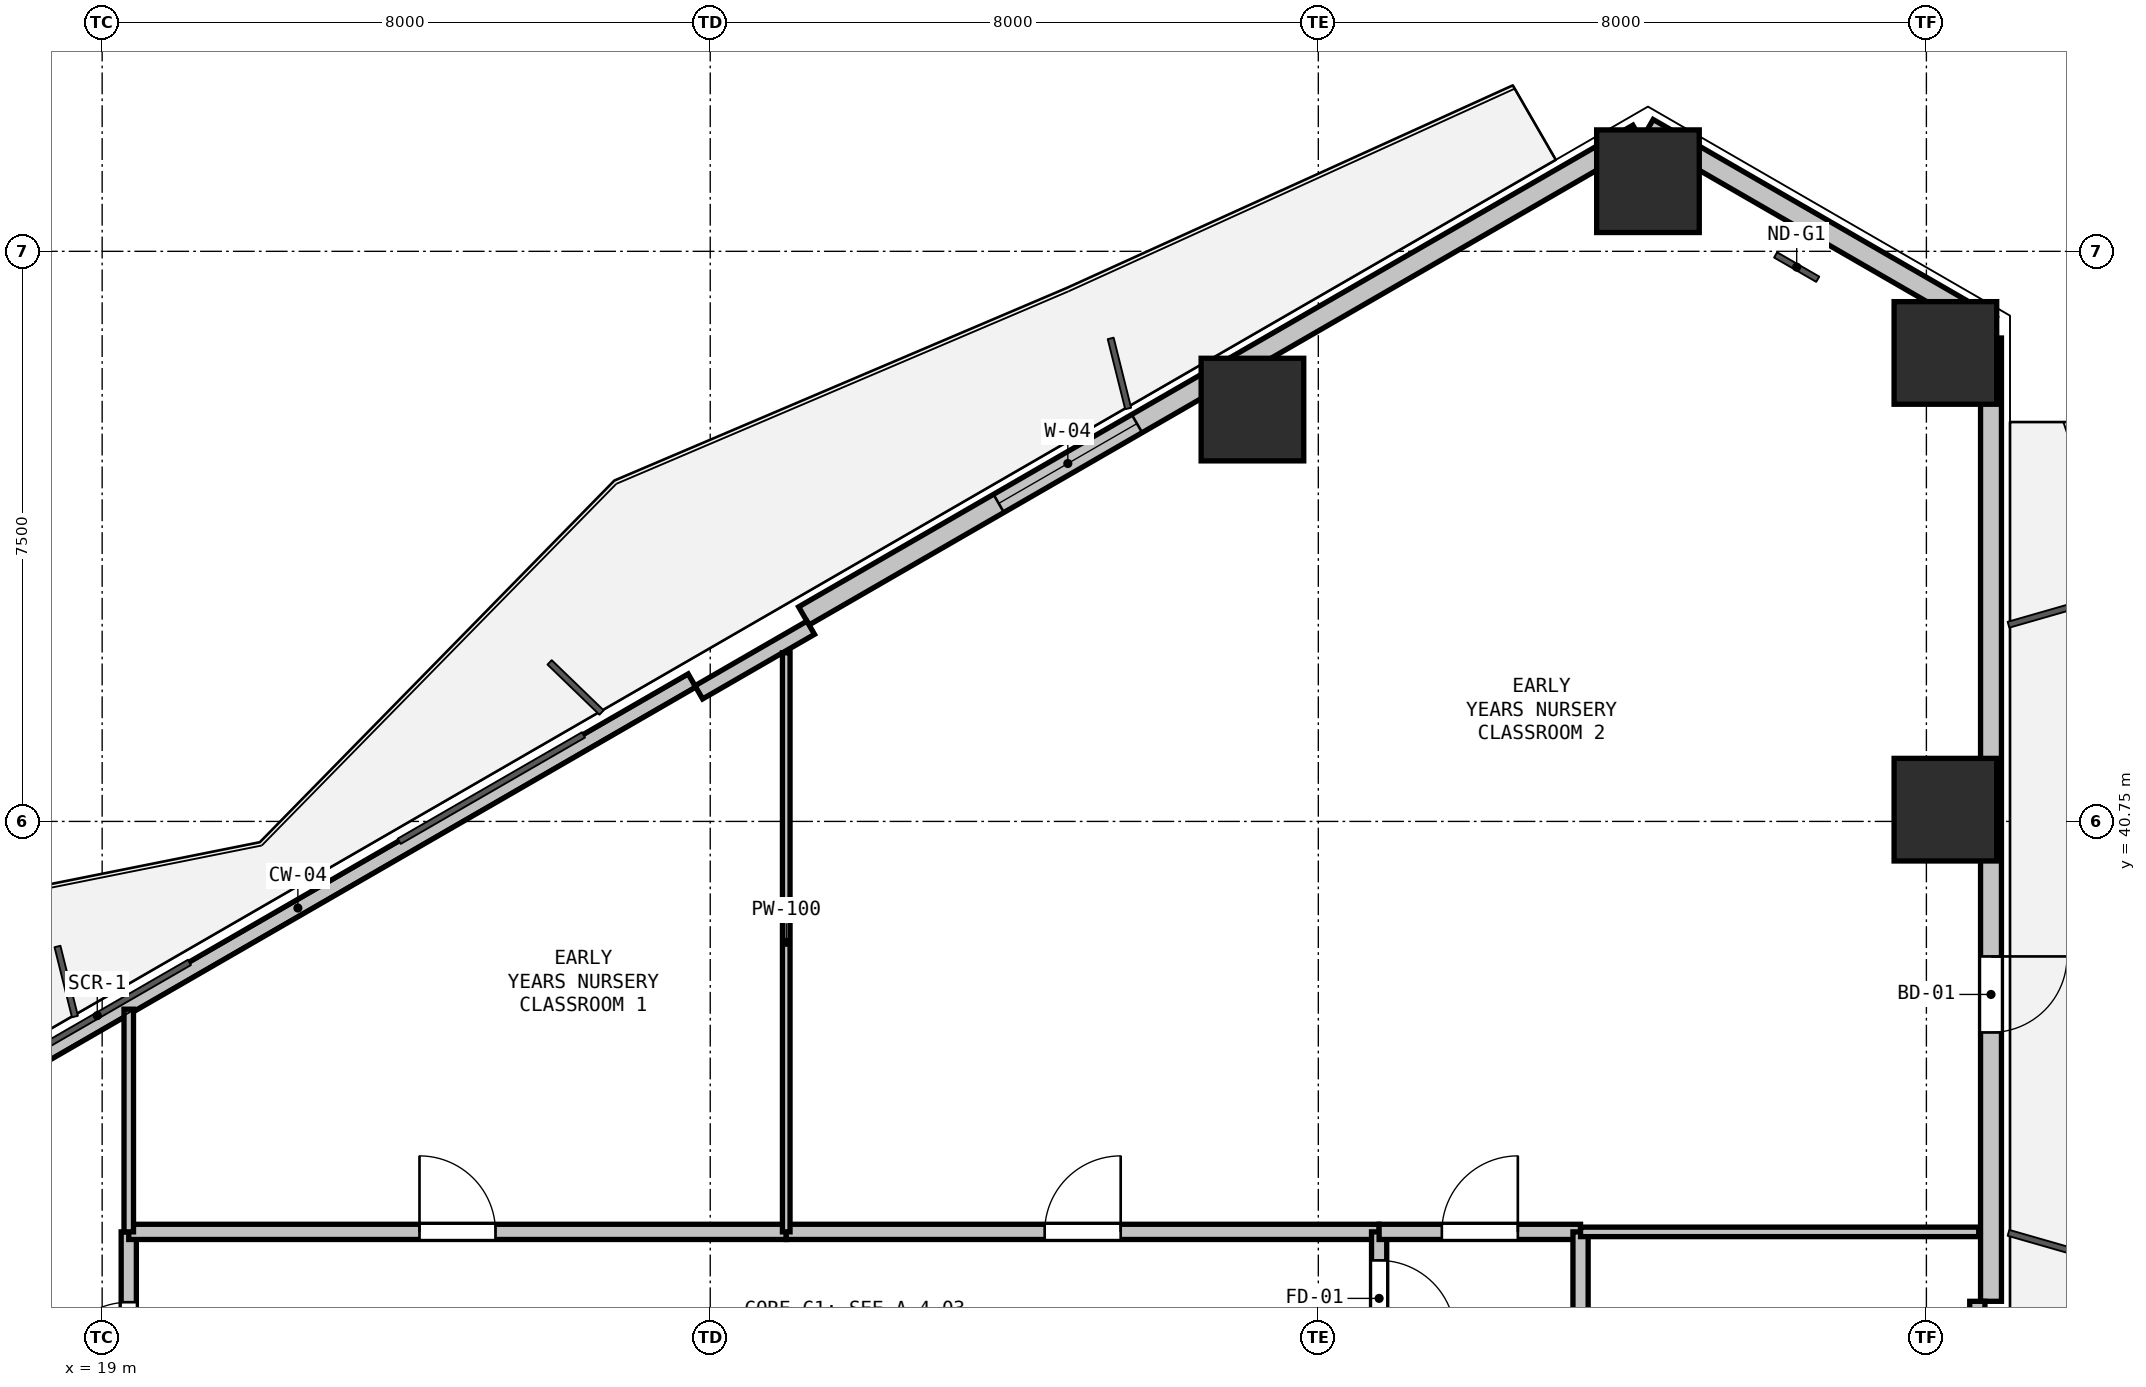
"""IFC4 building model, lengths in metres.
Left out: names, types, materials, properties, quantities, classifications, styles, units other than length and angle.
Written with IfcOpenShell. Run it as: python <this file> out.ifc"""

import sys

from ifc_helpers import new_model, si_unit, direction, frame, frame_2d, origin, origin_2d, place, context, subcontext, project, spatial, rectangle, hollow_rectangle, extrude, element, fill, save


model = new_model("IFC4")
c1 = context("Model", 3, precision=1e-05, world=origin(), true_north=direction((0.0, 1.0)))
c2 = subcontext(c1, "Body", "Model", "MODEL_VIEW")
j1 = project(units=[si_unit("LENGTHUNIT", "METRE"), si_unit("PLANEANGLEUNIT", "RADIAN")], contexts=[c1])
p1 = place(None, origin())
s1 = spatial("IfcSite", under=j1, at=p1, CompositionType="ELEMENT")
p2 = place(p1, origin())
s2 = spatial("IfcBuilding", under=s1, at=p2, CompositionType="ELEMENT")
p3 = place(p2, frame((0.0, 0.0, 19.2)))
s3 = spatial("IfcBuildingStorey", under=s2, at=p3, CompositionType="ELEMENT", Elevation=19.2)
for number, where, z_axis, x_axis in (
    (1, (34.133, 46.168, 0.0), (0.0, 0.0, 1.0), (1.0, 0.0, 0.0)),
    (2, (39.337, 49.173, 0.0), (0.0, 0.0, 1.0), (1.0, 0.0, 0.0)),
    (3, (43.25, 46.913, 0.0), (0.0, 0.0, 1.0), (1.0, 0.0, 0.0)),
    (4, (43.25, 40.905, 0.0), (0.0, 0.0, 1.0), (1.0, 0.0, 0.0)),
):
    element("IfcColumn", number, at=place(p3, frame(where, z_axis=z_axis, x_axis=x_axis)), inside=s3, PredefinedType="COLUMN", context=c2, shape_type="SweptSolid", body=[
        extrude(hollow_rectangle(XDim=1.35, YDim=1.35, WallThickness=0.036, at=origin_2d()), origin(), (0.0, 0.0, 1.0), 3.3),
    ])
p4 = place(p3, frame((39.337, 49.865, 0.0), z_axis=(0.0, 0.0, 1.0), x_axis=(0.866043601342, -0.499968479581, 0.0)))
e5 = element("IfcWall", 5, at=p4, inside=s3, PredefinedType="SOLIDWALL", context=c2, shape_type="SweptSolid", body=[
    extrude(rectangle(XDim=5.211, YDim=0.275, at=frame_2d((2.605, 0.0))), origin(), (0.0, 0.0, 1.0), 2.66),
])
p5 = place(p3, frame((16.39, 36.617, 0.0), z_axis=(0.0, 0.0, 1.0), x_axis=(0.866027351828, 0.499996625875, 0.0)))
e6 = element("IfcWall", 6, at=p5, inside=s3, PredefinedType="PARAPET", context=c2, shape_type="SweptSolid", body=[
    extrude(rectangle(XDim=11.973, YDim=0.2, at=frame_2d((5.987, 0.0))), origin(), (0.0, 0.0, 1.0), 0.2),
])
p6 = place(p3, frame((28.232, 43.454, 0.0), z_axis=(0.0, 0.0, 1.0), x_axis=(0.86603192154, 0.499988710747, 0.0)))
e7 = element("IfcWall", 7, at=p6, inside=s3, PredefinedType="SOLIDWALL", context=c2, shape_type="SweptSolid", body=[
    extrude(rectangle(XDim=12.673, YDim=0.275, at=frame_2d((6.336, 0.0))), origin(), (0.0, 0.0, 1.0), 2.66),
])
p7 = place(p6, frame((2.96, 0.0, 0.9)))
e8 = element("IfcOpeningElement", 8, at=p7, cuts=e7, PredefinedType="OPENING", context=c2, shape_type="SweptSolid", body=[
    extrude(rectangle(XDim=2.1, YDim=1.6, at=frame_2d((1.05, 0.8))), frame((0.0, 0.147, 0.0), z_axis=(0.0, -1.0, 0.0), x_axis=(1.0, 0.0, 0.0)), (0.0, 0.0, 1.0), 0.295),
])
p8 = place(p3, frame((26.85, 42.448, 0.0), z_axis=(0.0, 0.0, 1.0), x_axis=(0.86605165483, 0.499954529098, 0.0)))
e9 = element("IfcWall", 9, at=p8, inside=s3, PredefinedType="PARAPET", context=c2, shape_type="SweptSolid", body=[
    extrude(rectangle(XDim=1.7, YDim=0.2, at=frame_2d((0.85, 0.0))), origin(), (0.0, 0.0, 1.0), 2.66),
])
p9 = place(p3, frame((43.85, 47.11, 0.0), z_axis=(0.0, 0.0, 1.0), x_axis=(0.0, -1.0, 0.0)))
e10 = element("IfcWall", 10, at=p9, inside=s3, PredefinedType="SOLIDWALL", context=c2, shape_type="SweptSolid", body=[
    extrude(rectangle(XDim=12.673, YDim=0.275, at=frame_2d((6.336, 0.0))), origin(), (0.0, 0.0, 1.0), 2.66),
])
p10 = place(p9, frame((8.136, 0.0, 0.0)))
e11 = element("IfcOpeningElement", 11, at=p10, cuts=e10, PredefinedType="OPENING", context=c2, shape_type="SweptSolid", body=[
    extrude(rectangle(XDim=1.0, YDim=2.1, at=frame_2d((0.5, 1.05))), frame((0.0, 0.147, 0.0), z_axis=(0.0, -1.0, 0.0), x_axis=(1.0, 0.0, 0.0)), (0.0, 0.0, 1.0), 0.295),
])
p11 = place(p3, frame((43.67, 34.437, 0.0), z_axis=(0.0, 0.0, 1.0), x_axis=(0.0, -1.0, 0.0)))
e12 = element("IfcWall", 12, at=p11, inside=s3, PredefinedType="PARAPET", context=c2, shape_type="SweptSolid", body=[
    extrude(rectangle(XDim=1.7, YDim=0.2, at=frame_2d((0.85, 0.0))), origin(), (0.0, 0.0, 1.0), 2.66),
])
p12 = place(p3, frame((19.35, 32.5, 0.0), z_axis=(0.0, 0.0, 1.0), x_axis=(0.0, 1.0, 0.0)))
e13 = element("IfcWall", 13, at=p12, inside=s3, PredefinedType="PARTITIONING", context=c2, shape_type="SweptSolid", body=[
    extrude(rectangle(XDim=2.85, YDim=0.2, at=frame_2d((1.425, 0.0))), origin(), (0.0, 0.0, 1.0), 2.338),
])
p13 = place(p12, frame((0.925, 0.0, 0.0)))
e14 = element("IfcOpeningElement", 14, at=p13, cuts=e13, PredefinedType="OPENING", context=c2, shape_type="SweptSolid", body=[
    extrude(rectangle(XDim=1.0, YDim=2.15, at=frame_2d((0.5, 1.075))), frame((0.0, 0.11, 0.0), z_axis=(0.0, -1.0, 0.0), x_axis=(1.0, 0.0, 0.0)), (0.0, 0.0, 1.0), 0.22),
])
p14 = place(p3, frame((19.35, 35.35, 0.0), z_axis=(0.0, 0.0, 1.0), x_axis=(1.0, 0.0, 0.0)))
e15 = element("IfcWall", 15, at=p14, inside=s3, PredefinedType="PARTITIONING", context=c2, shape_type="SweptSolid", body=[
    extrude(rectangle(XDim=8.65, YDim=0.2, at=frame_2d((4.325, 0.0))), origin(), (0.0, 0.0, 1.0), 3.04),
])
p15 = place(p14, frame((3.825, 0.0, 0.0)))
e16 = element("IfcOpeningElement", 16, at=p15, cuts=e15, PredefinedType="OPENING", context=c2, shape_type="SweptSolid", body=[
    extrude(rectangle(XDim=1.0, YDim=2.15, at=frame_2d((0.5, 1.075))), frame((0.0, 0.11, 0.0), z_axis=(0.0, -1.0, 0.0), x_axis=(1.0, 0.0, 0.0)), (0.0, 0.0, 1.0), 0.22),
])
p16 = place(p3, frame((28.0, 35.35, 0.0), z_axis=(0.0, 0.0, 1.0), x_axis=(1.0, 0.0, 0.0)))
e17 = element("IfcWall", 17, at=p16, inside=s3, PredefinedType="PARTITIONING", context=c2, shape_type="SweptSolid", body=[
    extrude(rectangle(XDim=7.8, YDim=0.2, at=frame_2d((3.9, 0.0))), origin(), (0.0, 0.0, 1.0), 3.04),
])
p17 = place(p16, frame((3.4, 0.0, 0.0)))
e18 = element("IfcOpeningElement", 18, at=p17, cuts=e17, PredefinedType="OPENING", context=c2, shape_type="SweptSolid", body=[
    extrude(rectangle(XDim=1.0, YDim=2.15, at=frame_2d((0.5, 1.075))), frame((0.0, 0.11, 0.0), z_axis=(0.0, -1.0, 0.0), x_axis=(1.0, 0.0, 0.0)), (0.0, 0.0, 1.0), 0.22),
])
p18 = place(p3, frame((35.8, 35.35, 0.0), z_axis=(0.0, 0.0, 1.0), x_axis=(0.0, -1.0, 0.0)))
e19 = element("IfcWall", 19, at=p18, inside=s3, PredefinedType="PARTITIONING", context=c2, shape_type="SweptSolid", body=[
    extrude(rectangle(XDim=1.75, YDim=0.2, at=frame_2d((0.875, 0.0))), origin(), (0.0, 0.0, 1.0), 3.04),
])
p19 = place(p18, frame((0.375, 0.0, 0.0)))
e20 = element("IfcOpeningElement", 20, at=p19, cuts=e19, PredefinedType="OPENING", context=c2, shape_type="SweptSolid", body=[
    extrude(rectangle(XDim=1.0, YDim=2.15, at=frame_2d((0.5, 1.075))), frame((0.0, 0.11, 0.0), z_axis=(0.0, -1.0, 0.0), x_axis=(1.0, 0.0, 0.0)), (0.0, 0.0, 1.0), 0.22),
])
p20 = place(p3, frame((35.8, 35.35, 0.0), z_axis=(0.0, 0.0, 1.0), x_axis=(1.0, 0.0, 0.0)))
e21 = element("IfcWall", 21, at=p20, inside=s3, PredefinedType="PARTITIONING", context=c2, shape_type="SweptSolid", body=[
    extrude(rectangle(XDim=2.65, YDim=0.2, at=frame_2d((1.325, 0.0))), origin(), (0.0, 0.0, 1.0), 2.338),
])
p21 = place(p20, frame((0.825, 0.0, 0.0)))
e22 = element("IfcOpeningElement", 22, at=p21, cuts=e21, PredefinedType="OPENING", context=c2, shape_type="SweptSolid", body=[
    extrude(rectangle(XDim=1.0, YDim=2.15, at=frame_2d((0.5, 1.075))), frame((0.0, 0.11, 0.0), z_axis=(0.0, -1.0, 0.0), x_axis=(1.0, 0.0, 0.0)), (0.0, 0.0, 1.0), 0.22),
])
p22 = place(p3, frame((38.45, 35.35, 0.0), z_axis=(0.0, 0.0, 1.0), x_axis=(0.0, -1.0, 0.0)))
e23 = element("IfcWall", 23, at=p22, inside=s3, PredefinedType="PARTITIONING", context=c2, shape_type="SweptSolid", body=[
    extrude(rectangle(XDim=17.2, YDim=0.2, at=frame_2d((8.6, 0.0))), origin(), (0.0, 0.0, 1.0), 3.04),
])
p23 = place(p22, frame((7.7, 0.0, 0.0)))
e24 = element("IfcOpeningElement", 24, at=p23, cuts=e23, PredefinedType="OPENING", context=c2, shape_type="SweptSolid", body=[
    extrude(rectangle(XDim=1.8, YDim=2.2, at=frame_2d((0.9, 1.1))), frame((0.0, 0.11, 0.0), z_axis=(0.0, -1.0, 0.0), x_axis=(1.0, 0.0, 0.0)), (0.0, 0.0, 1.0), 0.22),
])
p24 = place(p3, frame((19.35, 35.35, 0.0), z_axis=(0.0, 0.0, 1.0), x_axis=(0.0, 1.0, 0.0)))
e25 = element("IfcWall", 25, at=p24, inside=s3, PredefinedType="PARTITIONING", context=c2, shape_type="SweptSolid", body=[
    extrude(rectangle(XDim=2.93, YDim=0.125, at=frame_2d((1.465, 0.0))), origin(), (0.0, 0.0, 1.0), 2.365),
])
p25 = place(p3, frame((28.0, 42.969, 0.0), z_axis=(0.0, 0.0, 1.0), x_axis=(0.0, -1.0, 0.0)))
e26 = element("IfcWall", 26, at=p25, inside=s3, PredefinedType="PARTITIONING", context=c2, shape_type="SweptSolid", body=[
    extrude(rectangle(XDim=7.619, YDim=0.1, at=frame_2d((3.81, 0.0))), origin(), (0.0, 0.0, 1.0), 2.365),
])
p26 = place(p3, frame((43.688, 35.35, 0.0), z_axis=(0.0, 0.0, 1.0), x_axis=(-1.0, 0.0, 0.0)))
e27 = element("IfcWall", 27, at=p26, inside=s3, PredefinedType="PARTITIONING", context=c2, shape_type="SweptSolid", body=[
    extrude(rectangle(XDim=5.239, YDim=0.125, at=frame_2d((2.619, 0.0))), origin(), (0.0, 0.0, 1.0), 2.365),
])
p27 = place(p7, origin())
e28 = element("IfcWindow", 28, at=p27, inside=s3, PartitioningType="SINGLE_PANEL", PredefinedType="WINDOW", context=c2, shape_type="SweptSolid", body=[
    extrude(rectangle(XDim=2.1, YDim=1.6, at=frame_2d((1.05, 0.8))), frame((0.0, 0.03, 0.0), z_axis=(0.0, -1.0, 0.0), x_axis=(1.0, 0.0, 0.0)), (0.0, 0.0, 1.0), 0.06),
])
fill(e8, e28)
p28 = place(p10, origin())
e29 = element("IfcDoor", 29, at=p28, inside=s3, OperationType="SINGLE_SWING_LEFT", PredefinedType="DOOR", context=c2, shape_type="SweptSolid", body=[
    extrude(rectangle(XDim=1.0, YDim=2.1, at=frame_2d((0.5, 1.05))), frame((0.0, 0.025, 0.0), z_axis=(0.0, -1.0, 0.0), x_axis=(1.0, 0.0, 0.0)), (0.0, 0.0, 1.0), 0.05),
])
fill(e11, e29)
p29 = place(p19, origin())
e30 = element("IfcDoor", 30, at=p29, inside=s3, OperationType="SINGLE_SWING_RIGHT", PredefinedType="DOOR", context=c2, shape_type="SweptSolid", body=[
    extrude(rectangle(XDim=1.0, YDim=2.15, at=frame_2d((0.5, 1.075))), frame((0.0, 0.025, 0.0), z_axis=(0.0, -1.0, 0.0), x_axis=(1.0, 0.0, 0.0)), (0.0, 0.0, 1.0), 0.05),
])
fill(e20, e30)
p30 = place(p15, origin())
e31 = element("IfcDoor", 31, at=p30, inside=s3, OperationType="SINGLE_SWING_LEFT", PredefinedType="DOOR", context=c2, shape_type="SweptSolid", body=[
    extrude(rectangle(XDim=1.0, YDim=2.15, at=frame_2d((0.5, 1.075))), frame((0.0, 0.025, 0.0), z_axis=(0.0, -1.0, 0.0), x_axis=(1.0, 0.0, 0.0)), (0.0, 0.0, 1.0), 0.05),
])
fill(e16, e31)
p31 = place(p17, origin())
e32 = element("IfcDoor", 32, at=p31, inside=s3, OperationType="SINGLE_SWING_RIGHT", PredefinedType="DOOR", context=c2, shape_type="SweptSolid", body=[
    extrude(rectangle(XDim=1.0, YDim=2.15, at=frame_2d((0.5, 1.075))), frame((0.0, 0.025, 0.0), z_axis=(0.0, -1.0, 0.0), x_axis=(1.0, 0.0, 0.0)), (0.0, 0.0, 1.0), 0.05),
])
fill(e18, e32)
p32 = place(p13, origin())
e33 = element("IfcDoor", 33, at=p32, inside=s3, OperationType="SINGLE_SWING_LEFT", PredefinedType="DOOR", context=c2, shape_type="SweptSolid", body=[
    extrude(rectangle(XDim=1.0, YDim=2.15, at=frame_2d((0.5, 1.075))), frame((0.0, 0.025, 0.0), z_axis=(0.0, -1.0, 0.0), x_axis=(1.0, 0.0, 0.0)), (0.0, 0.0, 1.0), 0.05),
])
fill(e14, e33)
p33 = place(p21, origin())
e34 = element("IfcDoor", 34, at=p33, inside=s3, OperationType="SINGLE_SWING_RIGHT", PredefinedType="DOOR", context=c2, shape_type="SweptSolid", body=[
    extrude(rectangle(XDim=1.0, YDim=2.15, at=frame_2d((0.5, 1.075))), frame((0.0, 0.025, 0.0), z_axis=(0.0, -1.0, 0.0), x_axis=(1.0, 0.0, 0.0)), (0.0, 0.0, 1.0), 0.05),
])
fill(e22, e34)
save(model, sys.argv[1])
